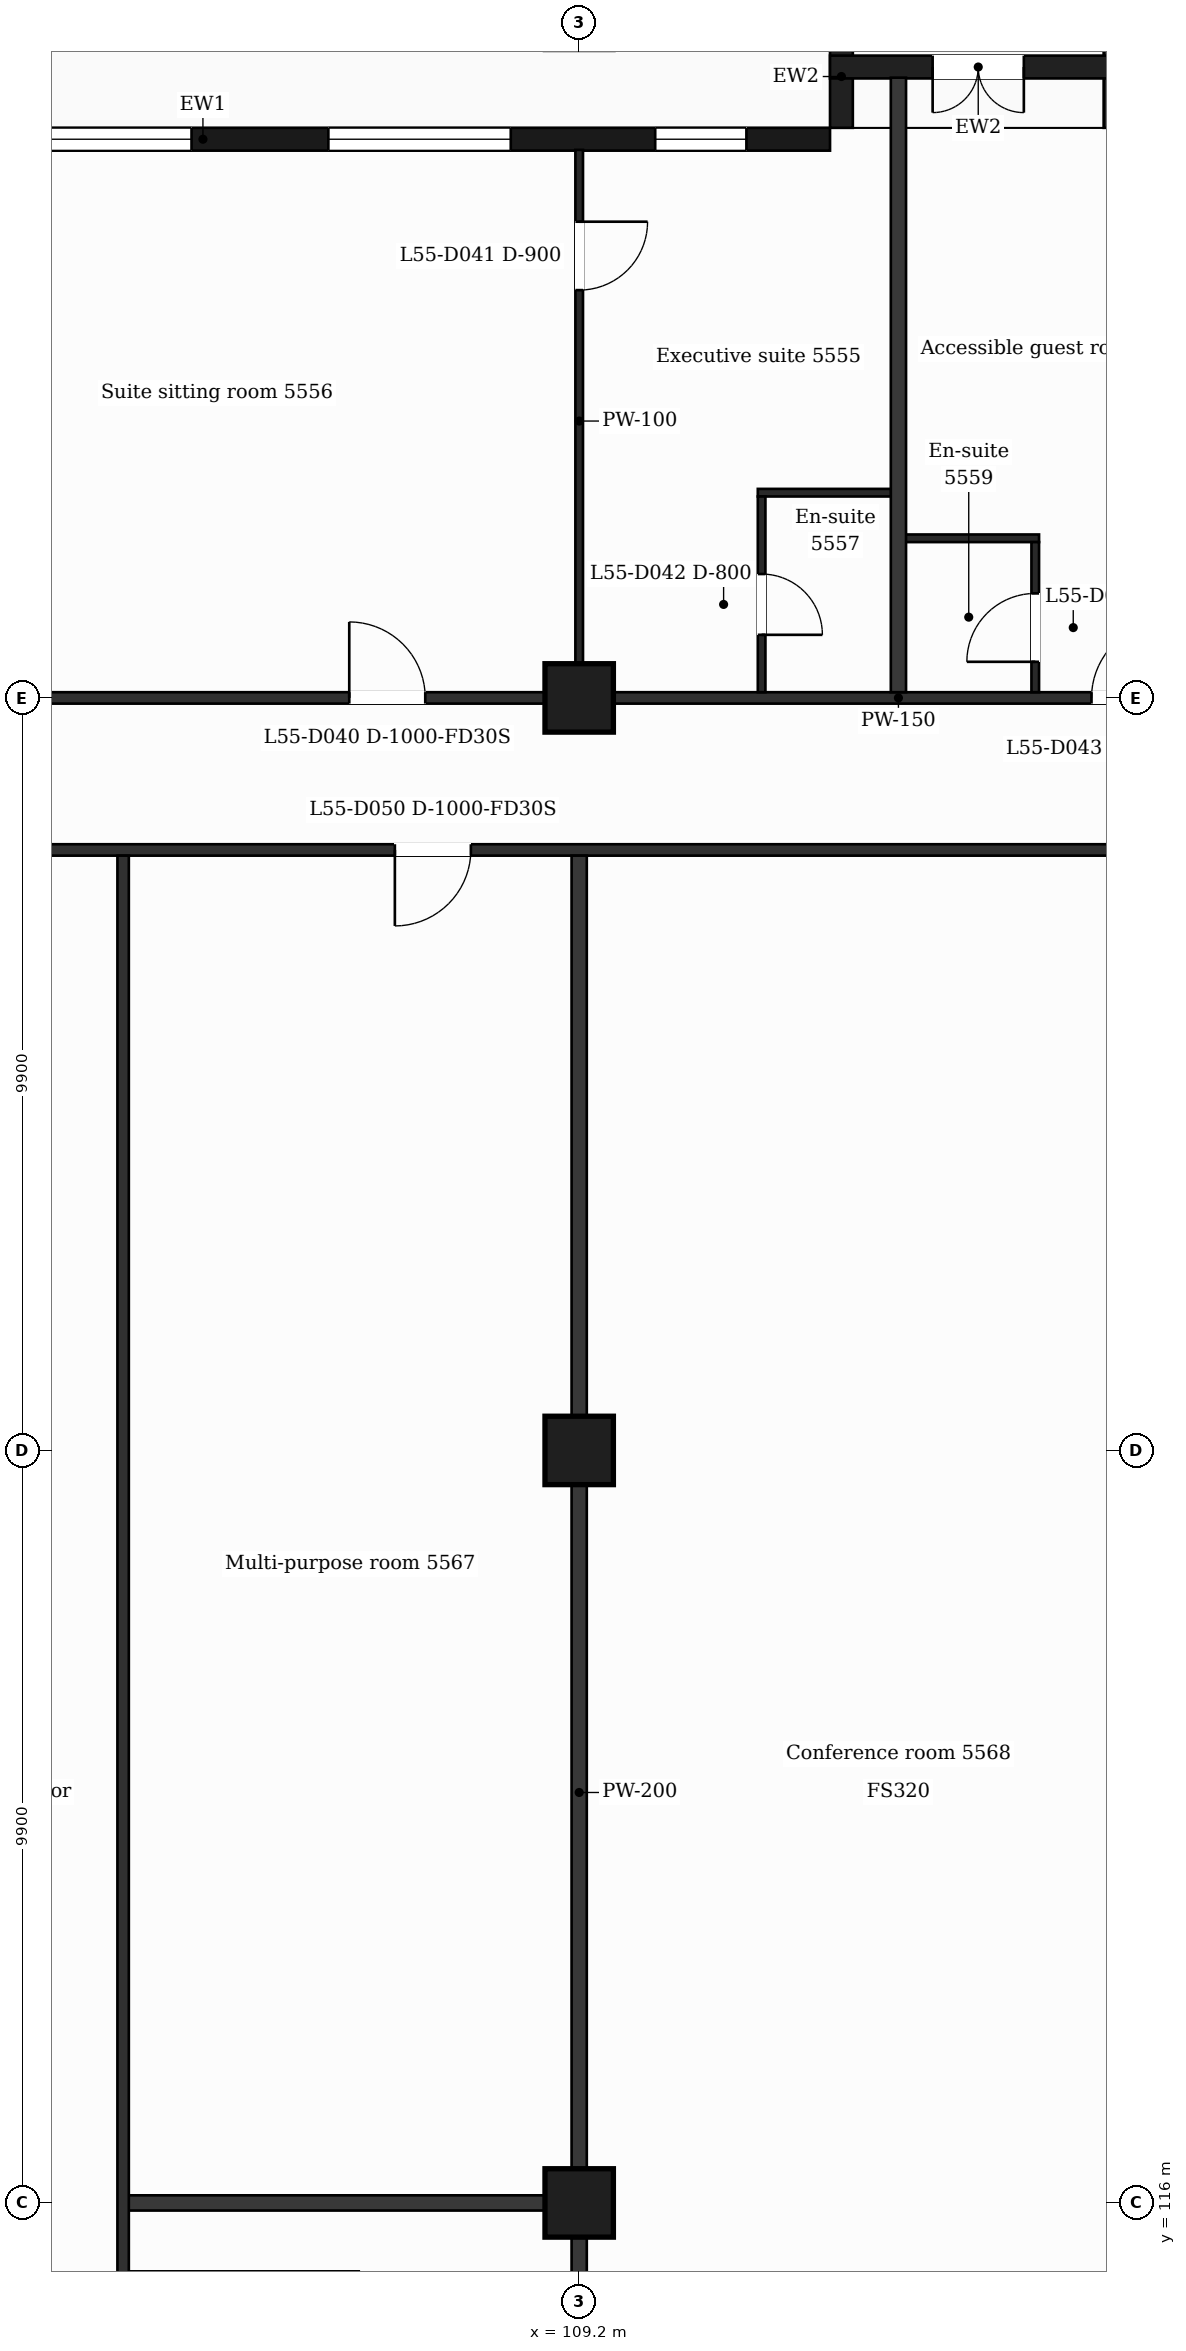
"""IFC4 building model, lengths in metres.
Left out: names, types, materials, properties, quantities, classifications, styles, units other than length and angle.
Written with IfcOpenShell. Run it as: python <this file> out.ifc"""

import sys

from ifc_helpers import new_model, si_unit, direction, frame, frame_2d, origin, origin_2d, place, context, subcontext, project, spatial, rectangle, extrude, element, fill, save


model = new_model("IFC4")
c1 = context("Model", 3, precision=1e-05, world=origin(), true_north=direction((0.0, 1.0)))
c2 = subcontext(c1, "Body", "Model", "MODEL_VIEW")
j1 = project(units=[si_unit("LENGTHUNIT", "METRE"), si_unit("PLANEANGLEUNIT", "RADIAN")], contexts=[c1])
p1 = place(None, origin())
s1 = spatial("IfcSite", under=j1, at=p1, CompositionType="ELEMENT")
p2 = place(p1, origin())
s2 = spatial("IfcBuilding", under=s1, at=p2, CompositionType="ELEMENT")
p3 = place(p2, frame((0.0, 0.0, 228.1)))
s3 = spatial("IfcBuildingStorey", under=s2, at=p3, CompositionType="ELEMENT", Elevation=228.1)
for number, where, z_axis, x_axis in (
    (1, (109.2, 116.0, 0.0), (0.0, 0.0, 1.0), (1.0, 0.0, 0.0)),
    (2, (109.2, 125.9, 0.0), (0.0, 0.0, 1.0), (1.0, 0.0, 0.0)),
    (3, (109.2, 135.8, 0.0), (0.0, 0.0, 1.0), (1.0, 0.0, 0.0)),
):
    element("IfcColumn", number, at=place(p3, frame(where, z_axis=z_axis, x_axis=x_axis)), inside=s3, PredefinedType="COLUMN", context=c2, shape_type="SweptSolid", body=[
        extrude(rectangle(XDim=0.9, YDim=0.9, at=origin_2d()), origin(), (0.0, 0.0, 1.0), 3.7),
    ])
p4 = place(p3, frame((112.5, 143.15, 0.0), z_axis=(0.0, 0.0, 1.0), x_axis=(-1.0, 0.0, 0.0)))
e4 = element("IfcWall", 4, at=p4, inside=s3, PredefinedType="SOLIDWALL", context=c2, shape_type="SweptSolid", body=[
    extrude(rectangle(XDim=16.5, YDim=0.3, at=frame_2d((8.25, 0.0))), origin(), (0.0, 0.0, 1.0), 3.38),
])
p5 = place(p4, frame((1.1, 0.0, 0.9)))
e5 = element("IfcOpeningElement", 5, at=p5, cuts=e4, PredefinedType="OPENING", context=c2, shape_type="SweptSolid", body=[
    extrude(rectangle(XDim=1.2, YDim=2.1, at=frame_2d((0.6, 1.05))), frame((0.0, 0.16, 0.0), z_axis=(0.0, -1.0, 0.0), x_axis=(1.0, 0.0, 0.0)), (0.0, 0.0, 1.0), 0.32),
])
p6 = place(p4, frame((4.2, 0.0, 0.9)))
e6 = element("IfcOpeningElement", 6, at=p6, cuts=e4, PredefinedType="OPENING", context=c2, shape_type="SweptSolid", body=[
    extrude(rectangle(XDim=2.4, YDim=2.1, at=frame_2d((1.2, 1.05))), frame((0.0, 0.16, 0.0), z_axis=(0.0, -1.0, 0.0), x_axis=(1.0, 0.0, 0.0)), (0.0, 0.0, 1.0), 0.32),
])
p7 = place(p4, frame((8.4, 0.0, 0.9)))
e7 = element("IfcOpeningElement", 7, at=p7, cuts=e4, PredefinedType="OPENING", context=c2, shape_type="SweptSolid", body=[
    extrude(rectangle(XDim=2.4, YDim=2.1, at=frame_2d((1.2, 1.05))), frame((0.0, 0.16, 0.0), z_axis=(0.0, -1.0, 0.0), x_axis=(1.0, 0.0, 0.0)), (0.0, 0.0, 1.0), 0.32),
])
p8 = place(p4, frame((12.3, 0.0, 0.0)))
e8 = element("IfcOpeningElement", 8, at=p8, cuts=e4, PredefinedType="OPENING", context=c2, shape_type="SweptSolid", body=[
    extrude(rectangle(XDim=1.2, YDim=2.4, at=frame_2d((0.6, 1.2))), frame((0.0, 0.16, 0.0), z_axis=(0.0, -1.0, 0.0), x_axis=(1.0, 0.0, 0.0)), (0.0, 0.0, 1.0), 0.32),
])
p9 = place(p4, frame((14.1, 0.0, 0.9)))
e9 = element("IfcOpeningElement", 9, at=p9, cuts=e4, PredefinedType="OPENING", context=c2, shape_type="SweptSolid", body=[
    extrude(rectangle(XDim=1.2, YDim=2.1, at=frame_2d((0.6, 1.05))), frame((0.0, 0.16, 0.0), z_axis=(0.0, -1.0, 0.0), x_axis=(1.0, 0.0, 0.0)), (0.0, 0.0, 1.0), 0.32),
])
for number, where, z_axis, x_axis in (
    (10, (116.25, 143.3, 0.0), (0.0, 0.0, 1.0), (0.0, 1.0, 0.0)),
    (11, (112.65, 143.3, 0.0), (0.0, 0.0, 1.0), (0.0, 1.0, 0.0)),
):
    element("IfcWall", number, at=place(p3, frame(where, z_axis=z_axis, x_axis=x_axis)), inside=s3, PredefinedType="SOLIDWALL", context=c2, shape_type="SweptSolid", body=[
        extrude(rectangle(XDim=1.35, YDim=0.3, at=frame_2d((0.675, 0.0))), origin(), (0.0, 0.0, 1.0), 3.38),
    ])
p10 = place(p3, frame((116.4, 144.1, 0.0), z_axis=(0.0, 0.0, 1.0), x_axis=(-1.0, 0.0, 0.0)))
e12 = element("IfcWall", 12, at=p10, inside=s3, PredefinedType="SOLIDWALL", context=c2, shape_type="SweptSolid", body=[
    extrude(rectangle(XDim=3.9, YDim=0.3, at=frame_2d((1.95, 0.0))), origin(), (0.0, 0.0, 1.0), 3.38),
])
p11 = place(p10, frame((1.35, 0.0, 0.0)))
e13 = element("IfcOpeningElement", 13, at=p11, cuts=e12, PredefinedType="OPENING", context=c2, shape_type="SweptSolid", body=[
    extrude(rectangle(XDim=1.2, YDim=2.4, at=frame_2d((0.6, 1.2))), frame((0.0, 0.16, 0.0), z_axis=(0.0, -1.0, 0.0), x_axis=(1.0, 0.0, 0.0)), (0.0, 0.0, 1.0), 0.32),
])
p12 = place(p3, frame((103.2, 116.0, 0.0), z_axis=(0.0, 0.0, 1.0), x_axis=(1.0, 0.0, 0.0)))
e14 = element("IfcWall", 14, at=p12, inside=s3, PredefinedType="PARTITIONING", context=c2, shape_type="SweptSolid", body=[
    extrude(rectangle(XDim=6.0, YDim=0.2, at=frame_2d((3.0, 0.0))), origin(), (0.0, 0.0, 1.0), 3.38),
])
p13 = place(p3, frame((100.725, 133.8, 0.0), z_axis=(0.0, 0.0, 1.0), x_axis=(1.0, 0.0, 0.0)))
e15 = element("IfcWall", 15, at=p13, inside=s3, PredefinedType="PARTITIONING", context=c2, shape_type="SweptSolid", body=[
    extrude(rectangle(XDim=25.35, YDim=0.15, at=frame_2d((12.675, 0.0))), origin(), (0.0, 0.0, 1.0), 3.38),
])
p14 = place(p13, frame((6.05, 0.0, 0.0)))
e16 = element("IfcOpeningElement", 16, at=p14, cuts=e15, PredefinedType="OPENING", context=c2, shape_type="SweptSolid", body=[
    extrude(rectangle(XDim=1.0, YDim=2.1, at=frame_2d((0.5, 1.05))), frame((0.0, 0.085, 0.0), z_axis=(0.0, -1.0, 0.0), x_axis=(1.0, 0.0, 0.0)), (0.0, 0.0, 1.0), 0.17),
])
p15 = place(p13, frame((19.375, 0.0, 0.0)))
e17 = element("IfcOpeningElement", 17, at=p15, cuts=e15, PredefinedType="OPENING", context=c2, shape_type="SweptSolid", body=[
    extrude(rectangle(XDim=1.0, YDim=2.1, at=frame_2d((0.5, 1.05))), frame((0.0, 0.085, 0.0), z_axis=(0.0, -1.0, 0.0), x_axis=(1.0, 0.0, 0.0)), (0.0, 0.0, 1.0), 0.17),
])
p16 = place(p3, frame((90.895, 135.8, 0.0), z_axis=(0.0, 0.0, 1.0), x_axis=(1.0, 0.0, 0.0)))
e18 = element("IfcWall", 18, at=p16, inside=s3, PredefinedType="PARTITIONING", context=c2, shape_type="SweptSolid", body=[
    extrude(rectangle(XDim=45.011, YDim=0.15, at=frame_2d((22.505, 0.0))), origin(), (0.0, 0.0, 1.0), 3.38),
])
p17 = place(p16, frame((6.906, 0.0, 0.0)))
e19 = element("IfcOpeningElement", 19, at=p17, cuts=e18, PredefinedType="OPENING", context=c2, shape_type="SweptSolid", body=[
    extrude(rectangle(XDim=1.0, YDim=2.1, at=frame_2d((0.5, 1.05))), frame((0.0, 0.085, 0.0), z_axis=(0.0, -1.0, 0.0), x_axis=(1.0, 0.0, 0.0)), (0.0, 0.0, 1.0), 0.17),
])
p18 = place(p16, frame((15.281, 0.0, 0.0)))
e20 = element("IfcOpeningElement", 20, at=p18, cuts=e18, PredefinedType="OPENING", context=c2, shape_type="SweptSolid", body=[
    extrude(rectangle(XDim=1.0, YDim=2.1, at=frame_2d((0.5, 1.05))), frame((0.0, 0.085, 0.0), z_axis=(0.0, -1.0, 0.0), x_axis=(1.0, 0.0, 0.0)), (0.0, 0.0, 1.0), 0.17),
])
p19 = place(p16, frame((25.045, 0.0, 0.0)))
e21 = element("IfcOpeningElement", 21, at=p19, cuts=e18, PredefinedType="OPENING", context=c2, shape_type="SweptSolid", body=[
    extrude(rectangle(XDim=1.0, YDim=2.1, at=frame_2d((0.5, 1.05))), frame((0.0, 0.085, 0.0), z_axis=(0.0, -1.0, 0.0), x_axis=(1.0, 0.0, 0.0)), (0.0, 0.0, 1.0), 0.17),
])
p20 = place(p16, frame((29.531, 0.0, 0.0)))
e22 = element("IfcOpeningElement", 22, at=p20, cuts=e18, PredefinedType="OPENING", context=c2, shape_type="SweptSolid", body=[
    extrude(rectangle(XDim=0.95, YDim=2.1, at=frame_2d((0.475, 1.05))), frame((0.0, 0.085, 0.0), z_axis=(0.0, -1.0, 0.0), x_axis=(1.0, 0.0, 0.0)), (0.0, 0.0, 1.0), 0.17),
])
p21 = place(p16, frame((39.814, 0.0, 0.0)))
e23 = element("IfcOpeningElement", 23, at=p21, cuts=e18, PredefinedType="OPENING", context=c2, shape_type="SweptSolid", body=[
    extrude(rectangle(XDim=0.95, YDim=2.1, at=frame_2d((0.475, 1.05))), frame((0.0, 0.085, 0.0), z_axis=(0.0, -1.0, 0.0), x_axis=(1.0, 0.0, 0.0)), (0.0, 0.0, 1.0), 0.17),
])
p22 = place(p3, frame((113.4, 137.9, 0.0), z_axis=(0.0, 0.0, 1.0), x_axis=(1.0, 0.0, 0.0)))
e24 = element("IfcWall", 24, at=p22, inside=s3, PredefinedType="PARTITIONING", context=c2, shape_type="SweptSolid", body=[
    extrude(rectangle(XDim=1.85, YDim=0.1, at=frame_2d((0.925, 0.0))), origin(), (0.0, 0.0, 1.0), 3.38),
])
p23 = place(p3, frame((111.55, 138.5, 0.0), z_axis=(0.0, 0.0, 1.0), x_axis=(1.0, 0.0, 0.0)))
e25 = element("IfcWall", 25, at=p23, inside=s3, PredefinedType="PARTITIONING", context=c2, shape_type="SweptSolid", body=[
    extrude(rectangle(XDim=1.85, YDim=0.1, at=frame_2d((0.925, 0.0))), origin(), (0.0, 0.0, 1.0), 3.38),
])
p24 = place(p3, frame((103.2, 109.075, 0.0), z_axis=(0.0, 0.0, 1.0), x_axis=(0.0, 1.0, 0.0)))
e26 = element("IfcWall", 26, at=p24, inside=s3, PredefinedType="PARTITIONING", context=c2, shape_type="SweptSolid", body=[
    extrude(rectangle(XDim=24.65, YDim=0.15, at=frame_2d((12.325, 0.0))), origin(), (0.0, 0.0, 1.0), 3.38),
])
p25 = place(p3, frame((109.2, 135.875, 0.0), z_axis=(0.0, 0.0, 1.0), x_axis=(0.0, 1.0, 0.0)))
e27 = element("IfcWall", 27, at=p25, inside=s3, PredefinedType="PARTITIONING", context=c2, shape_type="SweptSolid", body=[
    extrude(rectangle(XDim=7.135, YDim=0.1, at=frame_2d((3.567, 0.0))), origin(), (0.0, 0.0, 1.0), 3.38),
])
p26 = place(p25, frame((5.29, 0.0, 0.0)))
e28 = element("IfcOpeningElement", 28, at=p26, cuts=e27, PredefinedType="OPENING", context=c2, shape_type="SweptSolid", body=[
    extrude(rectangle(XDim=0.9, YDim=2.1, at=frame_2d((0.45, 1.05))), frame((0.0, 0.06, 0.0), z_axis=(0.0, -1.0, 0.0), x_axis=(1.0, 0.0, 0.0)), (0.0, 0.0, 1.0), 0.12),
])
p27 = place(p3, frame((109.2, 109.075, 0.0), z_axis=(0.0, 0.0, 1.0), x_axis=(0.0, 1.0, 0.0)))
e29 = element("IfcWall", 29, at=p27, inside=s3, PredefinedType="PARTITIONING", context=c2, shape_type="SweptSolid", body=[
    extrude(rectangle(XDim=24.65, YDim=0.2, at=frame_2d((12.325, 0.0))), origin(), (0.0, 0.0, 1.0), 3.38),
])
p28 = place(p3, frame((111.6, 135.875, 0.0), z_axis=(0.0, 0.0, 1.0), x_axis=(0.0, 1.0, 0.0)))
e30 = element("IfcWall", 30, at=p28, inside=s3, PredefinedType="PARTITIONING", context=c2, shape_type="SweptSolid", body=[
    extrude(rectangle(XDim=2.575, YDim=0.1, at=frame_2d((1.288, 0.0))), origin(), (0.0, 0.0, 1.0), 3.38),
])
p29 = place(p28, frame((0.755, 0.0, 0.0)))
e31 = element("IfcOpeningElement", 31, at=p29, cuts=e30, PredefinedType="OPENING", context=c2, shape_type="SweptSolid", body=[
    extrude(rectangle(XDim=0.8, YDim=2.1, at=frame_2d((0.4, 1.05))), frame((0.0, 0.06, 0.0), z_axis=(0.0, -1.0, 0.0), x_axis=(1.0, 0.0, 0.0)), (0.0, 0.0, 1.0), 0.12),
])
p30 = place(p3, frame((113.4, 135.875, 0.0), z_axis=(0.0, 0.0, 1.0), x_axis=(0.0, 1.0, 0.0)))
e32 = element("IfcWall", 32, at=p30, inside=s3, PredefinedType="PARTITIONING", context=c2, shape_type="SweptSolid", body=[
    extrude(rectangle(XDim=8.085, YDim=0.2, at=frame_2d((4.042, 0.0))), origin(), (0.0, 0.0, 1.0), 3.38),
])
p31 = place(p3, frame((115.2, 135.875, 0.0), z_axis=(0.0, 0.0, 1.0), x_axis=(0.0, 1.0, 0.0)))
e33 = element("IfcWall", 33, at=p31, inside=s3, PredefinedType="PARTITIONING", context=c2, shape_type="SweptSolid", body=[
    extrude(rectangle(XDim=1.975, YDim=0.1, at=frame_2d((0.988, 0.0))), origin(), (0.0, 0.0, 1.0), 3.38),
])
p32 = place(p31, frame((0.4, 0.0, 0.0)))
e34 = element("IfcOpeningElement", 34, at=p32, cuts=e33, PredefinedType="OPENING", context=c2, shape_type="SweptSolid", body=[
    extrude(rectangle(XDim=0.9, YDim=2.1, at=frame_2d((0.45, 1.05))), frame((0.0, 0.06, 0.0), z_axis=(0.0, -1.0, 0.0), x_axis=(1.0, 0.0, 0.0)), (0.0, 0.0, 1.0), 0.12),
])
p33 = place(p5, origin())
e35 = element("IfcWindow", 35, at=p33, inside=s3, PartitioningType="SINGLE_PANEL", PredefinedType="WINDOW", context=c2, shape_type="SweptSolid", body=[
    extrude(rectangle(XDim=1.2, YDim=2.1, at=frame_2d((0.6, 1.05))), frame((0.0, 0.03, 0.0), z_axis=(0.0, -1.0, 0.0), x_axis=(1.0, 0.0, 0.0)), (0.0, 0.0, 1.0), 0.06),
])
fill(e5, e35)
p34 = place(p6, origin())
e36 = element("IfcWindow", 36, at=p34, inside=s3, PartitioningType="SINGLE_PANEL", PredefinedType="WINDOW", context=c2, shape_type="SweptSolid", body=[
    extrude(rectangle(XDim=2.4, YDim=2.1, at=frame_2d((1.2, 1.05))), frame((0.0, 0.03, 0.0), z_axis=(0.0, -1.0, 0.0), x_axis=(1.0, 0.0, 0.0)), (0.0, 0.0, 1.0), 0.06),
])
fill(e6, e36)
p35 = place(p7, origin())
e37 = element("IfcWindow", 37, at=p35, inside=s3, PartitioningType="SINGLE_PANEL", PredefinedType="WINDOW", context=c2, shape_type="SweptSolid", body=[
    extrude(rectangle(XDim=2.4, YDim=2.1, at=frame_2d((1.2, 1.05))), frame((0.0, 0.03, 0.0), z_axis=(0.0, -1.0, 0.0), x_axis=(1.0, 0.0, 0.0)), (0.0, 0.0, 1.0), 0.06),
])
fill(e7, e37)
p36 = place(p11, origin())
e38 = element("IfcDoor", 38, at=p36, inside=s3, OperationType="DOUBLE_DOOR_SINGLE_SWING", PredefinedType="DOOR", context=c2, shape_type="SweptSolid", body=[
    extrude(rectangle(XDim=1.2, YDim=2.4, at=frame_2d((0.6, 1.2))), frame((0.0, 0.025, 0.0), z_axis=(0.0, -1.0, 0.0), x_axis=(1.0, 0.0, 0.0)), (0.0, 0.0, 1.0), 0.05),
])
fill(e13, e38)
p37 = place(p18, origin())
e39 = element("IfcDoor", 39, at=p37, inside=s3, OperationType="SINGLE_SWING_LEFT", PredefinedType="DOOR", context=c2, shape_type="SweptSolid", body=[
    extrude(rectangle(XDim=1.0, YDim=2.1, at=frame_2d((0.5, 1.05))), frame((0.0, 0.025, 0.0), z_axis=(0.0, -1.0, 0.0), x_axis=(1.0, 0.0, 0.0)), (0.0, 0.0, 1.0), 0.05),
])
fill(e20, e39)
p38 = place(p26, origin())
e40 = element("IfcDoor", 40, at=p38, inside=s3, OperationType="SINGLE_SWING_RIGHT", PredefinedType="DOOR", context=c2, shape_type="SweptSolid", body=[
    extrude(rectangle(XDim=0.9, YDim=2.1, at=frame_2d((0.45, 1.05))), frame((0.0, 0.025, 0.0), z_axis=(0.0, -1.0, 0.0), x_axis=(1.0, 0.0, 0.0)), (0.0, 0.0, 1.0), 0.05),
])
fill(e28, e40)
p39 = place(p29, origin())
e41 = element("IfcDoor", 41, at=p39, inside=s3, OperationType="SINGLE_SWING_LEFT", PredefinedType="DOOR", context=c2, shape_type="SweptSolid", body=[
    extrude(rectangle(XDim=0.8, YDim=2.1, at=frame_2d((0.4, 1.05))), frame((0.0, 0.025, 0.0), z_axis=(0.0, -1.0, 0.0), x_axis=(1.0, 0.0, 0.0)), (0.0, 0.0, 1.0), 0.05),
])
fill(e31, e41)
p40 = place(p19, origin())
e42 = element("IfcDoor", 42, at=p40, inside=s3, OperationType="SINGLE_SWING_RIGHT", PredefinedType="DOOR", context=c2, shape_type="SweptSolid", body=[
    extrude(rectangle(XDim=1.0, YDim=2.1, at=frame_2d((0.5, 1.05))), frame((0.0, 0.025, 0.0), z_axis=(0.0, -1.0, 0.0), x_axis=(1.0, 0.0, 0.0)), (0.0, 0.0, 1.0), 0.05),
])
fill(e21, e42)
p41 = place(p32, origin())
e43 = element("IfcDoor", 43, at=p41, inside=s3, OperationType="SINGLE_SWING_LEFT", PredefinedType="DOOR", context=c2, shape_type="SweptSolid", body=[
    extrude(rectangle(XDim=0.9, YDim=2.1, at=frame_2d((0.45, 1.05))), frame((0.0, 0.025, 0.0), z_axis=(0.0, -1.0, 0.0), x_axis=(1.0, 0.0, 0.0)), (0.0, 0.0, 1.0), 0.05),
])
fill(e34, e43)
p42 = place(p14, origin())
e44 = element("IfcDoor", 44, at=p42, inside=s3, OperationType="SINGLE_SWING_LEFT", PredefinedType="DOOR", context=c2, shape_type="SweptSolid", body=[
    extrude(rectangle(XDim=1.0, YDim=2.1, at=frame_2d((0.5, 1.05))), frame((0.0, 0.025, 0.0), z_axis=(0.0, -1.0, 0.0), x_axis=(1.0, 0.0, 0.0)), (0.0, 0.0, 1.0), 0.05),
])
fill(e16, e44)
save(model, sys.argv[1])
